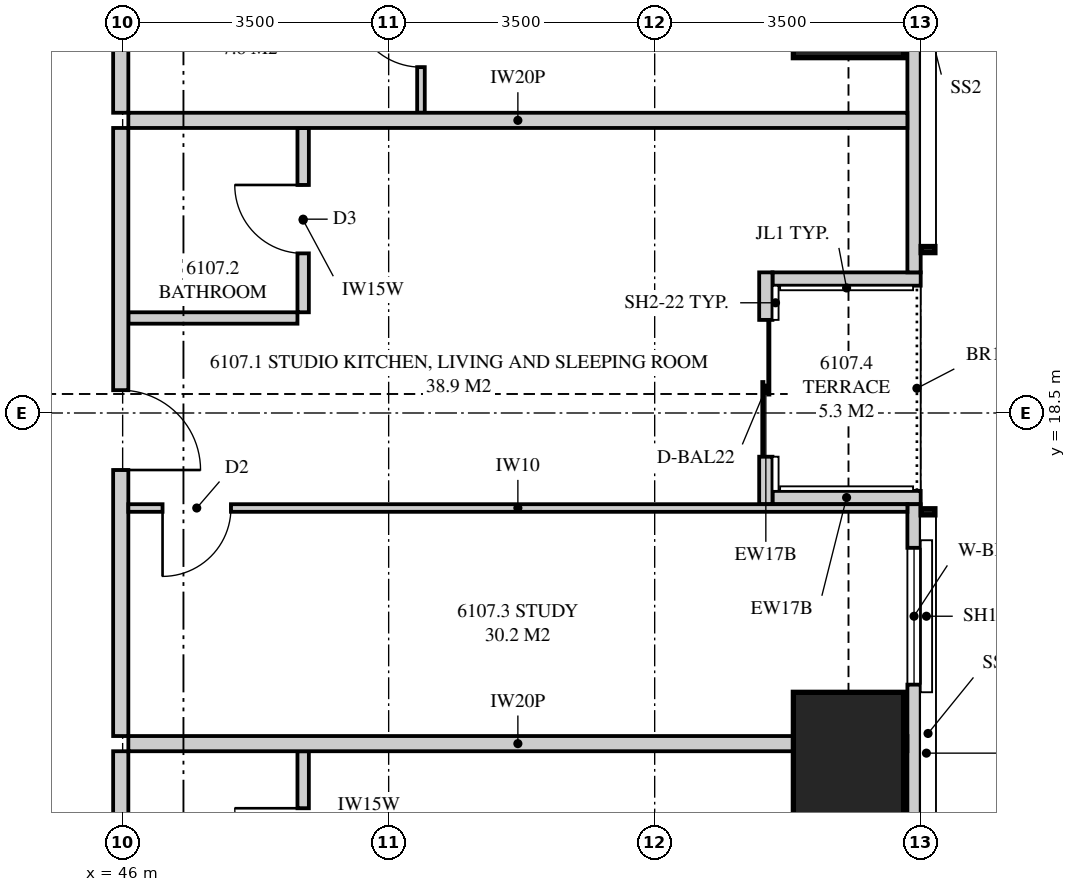
"""IFC4 building model, lengths in metres.
Left out: names, types, materials, properties, quantities, classifications, styles, units other than length and angle.
Written with IfcOpenShell. Run it as: python <this file> out.ifc"""

import sys

from ifc_helpers import new_model, si_unit, direction, frame, frame_2d, origin, origin_2d, place, context, subcontext, project, spatial, polyline, rectangle, outline, extrude, element, fill, save


model = new_model("IFC4")
c1 = context("Model", 3, precision=1e-05, world=origin(), true_north=direction((0.0, 1.0)))
c2 = subcontext(c1, "Body", "Model", "MODEL_VIEW")
j1 = project(units=[si_unit("LENGTHUNIT", "METRE"), si_unit("PLANEANGLEUNIT", "RADIAN")], contexts=[c1])
p1 = place(None, origin())
s1 = spatial("IfcSite", under=j1, at=p1, CompositionType="ELEMENT")
p2 = place(p1, origin())
s2 = spatial("IfcBuilding", under=s1, at=p2, CompositionType="ELEMENT")
p3 = place(p2, frame((0.0, 0.0, 224.95)))
s3 = spatial("IfcBuildingStorey", under=s2, at=p3, CompositionType="ELEMENT", Elevation=224.95)
for number, where, z_axis, x_axis in (
    (1, (55.55, 13.0, 0.0), (0.0, 0.0, 1.0), (1.0, 0.0, 0.0)),
    (2, (55.55, 25.0, 0.0), (0.0, 0.0, 1.0), (1.0, 0.0, 0.0)),
):
    element("IfcColumn", number, at=place(p3, frame(where, z_axis=z_axis, x_axis=x_axis)), inside=s3, PredefinedType="COLUMN", context=c2, shape_type="SweptSolid", body=[
        extrude(rectangle(XDim=1.45, YDim=3.65, at=origin_2d()), origin(), (0.0, 0.0, 1.0), 3.5),
    ])
p4 = place(p3, frame((56.413, 3.051, 0.0), z_axis=(0.0, 0.0, 1.0), x_axis=(0.0, 1.0, 0.0)))
e3 = element("IfcWall", 3, at=p4, inside=s3, PredefinedType="SOLIDWALL", context=c2, shape_type="SweptSolid", body=[
    extrude(outline(polyline([(0.0, 0.0), (14.249, 0.0), (14.249, 2.3), (9.949, 2.3), (9.949, 3.26), (9.858, 3.26), (9.858, 2.3), (9.688, 2.3), (9.688, 3.26), (0.0, 3.26), (0.0, 0.0)])), frame((0.0, 0.087, 0.0), z_axis=(0.0, -1.0, 0.0), x_axis=(1.0, 0.0, 0.0)), (0.0, 0.0, 1.0), 0.175),
])
p5 = place(p4, frame((1.487, 0.0, 0.4)))
e4 = element("IfcOpeningElement", 4, at=p5, cuts=e3, PredefinedType="OPENING", context=c2, shape_type="SweptSolid", body=[
    extrude(rectangle(XDim=1.8, YDim=1.85, at=frame_2d((0.9, 0.925))), frame((0.0, 0.097, 0.0), z_axis=(0.0, -1.0, 0.0), x_axis=(1.0, 0.0, 0.0)), (0.0, 0.0, 1.0), 0.195),
])
p6 = place(p4, frame((5.616, 0.0, 0.4)))
e5 = element("IfcOpeningElement", 5, at=p6, cuts=e3, PredefinedType="OPENING", context=c2, shape_type="SweptSolid", body=[
    extrude(rectangle(XDim=2.4, YDim=1.85, at=frame_2d((1.2, 0.925))), frame((0.0, 0.097, 0.0), z_axis=(0.0, -1.0, 0.0), x_axis=(1.0, 0.0, 0.0)), (0.0, 0.0, 1.0), 0.195),
])
p7 = place(p4, frame((11.875, 0.0, 0.4)))
e6 = element("IfcOpeningElement", 6, at=p7, cuts=e3, PredefinedType="OPENING", context=c2, shape_type="SweptSolid", body=[
    extrude(rectangle(XDim=1.8, YDim=1.85, at=frame_2d((0.9, 0.925))), frame((0.0, 0.097, 0.0), z_axis=(0.0, -1.0, 0.0), x_axis=(1.0, 0.0, 0.0)), (0.0, 0.0, 1.0), 0.195),
])
p8 = place(p3, frame((56.413, 20.35, 0.0), z_axis=(0.0, 0.0, 1.0), x_axis=(0.0, 1.0, 0.0)))
e7 = element("IfcWall", 7, at=p8, inside=s3, PredefinedType="SOLIDWALL", context=c2, shape_type="SweptSolid", body=[
    extrude(outline(polyline([(0.0, 0.0), (10.599, 0.0), (10.599, 3.26), (4.858, 3.26), (4.858, 2.3), (4.793, 2.3), (4.793, 3.26), (4.65, 3.26), (4.65, 2.3), (0.0, 2.3), (0.0, 0.0)])), frame((0.0, 0.087, 0.0), z_axis=(0.0, -1.0, 0.0), x_axis=(1.0, 0.0, 0.0)), (0.0, 0.0, 1.0), 0.175),
])
p9 = place(p8, frame((6.575, 0.0, 0.4)))
e8 = element("IfcOpeningElement", 8, at=p9, cuts=e7, PredefinedType="OPENING", context=c2, shape_type="SweptSolid", body=[
    extrude(rectangle(XDim=1.8, YDim=1.85, at=frame_2d((0.9, 0.925))), frame((0.0, 0.097, 0.0), z_axis=(0.0, -1.0, 0.0), x_axis=(1.0, 0.0, 0.0)), (0.0, 0.0, 1.0), 0.195),
])
p10 = place(p3, frame((54.462, 17.3, 0.0), z_axis=(0.0, 0.0, 1.0), x_axis=(0.0, 1.0, 0.0)))
e9 = element("IfcWall", 9, at=p10, inside=s3, PredefinedType="SOLIDWALL", context=c2, shape_type="SweptSolid", body=[
    extrude(outline(polyline([(0.0, 0.0), (3.05, 0.0), (3.05, 3.26), (2.65, 3.26), (2.65, 2.66), (0.25, 2.66), (0.25, 3.26), (0.0, 3.26), (0.0, 0.0)])), frame((0.0, 0.087, 0.0), z_axis=(0.0, -1.0, 0.0), x_axis=(1.0, 0.0, 0.0)), (0.0, 0.0, 1.0), 0.175),
])
p11 = place(p10, frame((0.625, 0.0, 0.0)))
e10 = element("IfcOpeningElement", 10, at=p11, cuts=e9, PredefinedType="OPENING", context=c2, shape_type="SweptSolid", body=[
    extrude(rectangle(XDim=1.8, YDim=2.25, at=frame_2d((0.9, 1.125))), frame((0.0, 0.097, 0.0), z_axis=(0.0, -1.0, 0.0), x_axis=(1.0, 0.0, 0.0)), (0.0, 0.0, 1.0), 0.195),
])
for number, where, z_axis, x_axis in (
    (11, (56.5, 17.387, 0.0), (0.0, 0.0, 1.0), (-1.0, 0.0, 0.0)),
    (12, (56.5, 20.262, 0.0), (0.0, 0.0, 1.0), (-1.0, 0.0, 0.0)),
):
    element("IfcWall", number, at=place(p3, frame(where, z_axis=z_axis, x_axis=x_axis)), inside=s3, PredefinedType="SOLIDWALL", context=c2, shape_type="SweptSolid", body=[
        extrude(outline(polyline([(0.0, 0.0), (1.95, 0.0), (1.95, 3.26), (1.75, 3.26), (1.75, 2.3), (0.15, 2.3), (0.15, 3.26), (0.0, 3.26), (0.0, 0.0)])), frame((0.0, 0.087, 0.0), z_axis=(0.0, -1.0, 0.0), x_axis=(1.0, 0.0, 0.0)), (0.0, 0.0, 1.0), 0.175),
    ])
p12 = place(p3, frame((56.325, 14.15, 0.0), z_axis=(0.0, 0.0, 1.0), x_axis=(-1.0, 0.0, 0.0)))
e13 = element("IfcWall", 13, at=p12, inside=s3, PredefinedType="PARTITIONING", context=c2, shape_type="SweptSolid", body=[
    extrude(outline(polyline([(0.529, 2.3), (0.0, 2.3), (0.0, 0.0), (0.529, 0.0), (0.529, 0.396), (1.021, 0.396), (1.021, 0.0), (10.25, 0.0), (10.25, 2.66), (1.685, 2.66), (1.685, 2.3), (1.021, 2.3), (1.021, 1.904), (0.529, 1.904), (0.529, 2.3)])), frame((0.0, 0.1, 0.0), z_axis=(0.0, -1.0, 0.0), x_axis=(1.0, 0.0, 0.0)), (0.0, 0.0, 1.0), 0.2),
])
p13 = place(p3, frame((45.975, 8.025, 0.0), z_axis=(0.0, 0.0, 1.0), x_axis=(0.0, 1.0, 0.0)))
e14 = element("IfcWall", 14, at=p13, inside=s3, PredefinedType="PARTITIONING", context=c2, shape_type="SweptSolid", body=[
    extrude(outline(polyline([(0.0, 0.0), (6.025, 0.0), (6.025, 3.26), (6.025, 2.66), (5.085, 2.66), (0.0, 2.66), (0.0, 3.26), (0.0, 0.0)])), frame((0.0, 0.1, 0.0), z_axis=(0.0, -1.0, 0.0), x_axis=(1.0, 0.0, 0.0)), (0.0, 0.0, 1.0), 0.2),
])
p14 = place(p13, frame((2.512, 0.0, 0.0)))
e15 = element("IfcOpeningElement", 15, at=p14, cuts=e14, PredefinedType="OPENING", context=c2, shape_type="SweptSolid", body=[
    extrude(rectangle(XDim=1.05, YDim=2.2, at=frame_2d((0.525, 1.1))), frame((0.0, 0.11, 0.0), z_axis=(0.0, -1.0, 0.0), x_axis=(1.0, 0.0, 0.0)), (0.0, 0.0, 1.0), 0.22),
])
p15 = place(p3, frame((48.375, 11.625, 0.0), z_axis=(0.0, 0.0, 1.0), x_axis=(0.0, 1.0, 0.0)))
e16 = element("IfcWall", 16, at=p15, inside=s3, PredefinedType="PLUMBINGWALL", context=c2, shape_type="SweptSolid", body=[
    extrude(outline(polyline([(0.0, 0.0), (2.425, 0.0), (2.425, 3.26), (2.425, 2.66), (0.09, 2.66), (0.09, 3.26), (0.0, 3.26), (0.0, 0.0)])), frame((0.0, 0.075, 0.0), z_axis=(0.0, -1.0, 0.0), x_axis=(1.0, 0.0, 0.0)), (0.0, 0.0, 1.0), 0.15),
])
p16 = place(p15, frame((0.775, 0.0, 0.0)))
e17 = element("IfcOpeningElement", 17, at=p16, cuts=e16, PredefinedType="OPENING", context=c2, shape_type="SweptSolid", body=[
    extrude(rectangle(XDim=0.9, YDim=2.1, at=frame_2d((0.45, 1.05))), frame((0.0, 0.085, 0.0), z_axis=(0.0, -1.0, 0.0), x_axis=(1.0, 0.0, 0.0)), (0.0, 0.0, 1.0), 0.17),
])
p17 = place(p3, frame((56.325, 22.35, 0.0), z_axis=(0.0, 0.0, 1.0), x_axis=(-1.0, 0.0, 0.0)))
e18 = element("IfcWall", 18, at=p17, inside=s3, PredefinedType="PARTITIONING", context=c2, shape_type="SweptSolid", body=[
    extrude(outline(polyline([(0.0, 0.0), (10.25, 0.0), (10.25, 3.26), (1.685, 3.26), (1.685, 2.3), (0.0, 2.3), (0.0, 3.26), (0.0, 0.0)])), frame((0.0, 0.1, 0.0), z_axis=(0.0, -1.0, 0.0), x_axis=(1.0, 0.0, 0.0)), (0.0, 0.0, 1.0), 0.2),
])
p18 = place(p3, frame((45.975, 14.25, 0.0), z_axis=(0.0, 0.0, 1.0), x_axis=(0.0, 1.0, 0.0)))
e19 = element("IfcWall", 19, at=p18, inside=s3, PredefinedType="PARTITIONING", context=c2, shape_type="SweptSolid", body=[
    extrude(outline(polyline([(0.0, 0.0), (8.0, 0.0), (8.0, 3.26), (5.81, 3.26), (5.81, 2.66), (3.19, 2.66), (3.19, 3.26), (0.06, 3.26), (0.06, 2.66), (0.0, 2.66), (0.0, 3.26), (0.0, 0.0)])), frame((0.0, 0.1, 0.0), z_axis=(0.0, -1.0, 0.0), x_axis=(1.0, 0.0, 0.0)), (0.0, 0.0, 1.0), 0.2),
])
p19 = place(p18, frame((3.5, 0.0, 0.0)))
e20 = element("IfcOpeningElement", 20, at=p19, cuts=e19, PredefinedType="OPENING", context=c2, shape_type="SweptSolid", body=[
    extrude(rectangle(XDim=1.05, YDim=2.2, at=frame_2d((0.525, 1.1))), frame((0.0, 0.11, 0.0), z_axis=(0.0, -1.0, 0.0), x_axis=(1.0, 0.0, 0.0)), (0.0, 0.0, 1.0), 0.22),
])
p20 = place(p3, frame((48.375, 19.825, 0.0), z_axis=(0.0, 0.0, 1.0), x_axis=(0.0, 1.0, 0.0)))
e21 = element("IfcWall", 21, at=p20, inside=s3, PredefinedType="PLUMBINGWALL", context=c2, shape_type="SweptSolid", body=[
    extrude(outline(polyline([(0.0, 0.0), (2.425, 0.0), (2.425, 3.26), (0.21, 3.26), (0.21, 2.66), (0.0, 2.66), (0.0, 3.26), (0.0, 0.0)])), frame((0.0, 0.075, 0.0), z_axis=(0.0, -1.0, 0.0), x_axis=(1.0, 0.0, 0.0)), (0.0, 0.0, 1.0), 0.15),
])
p21 = place(p20, frame((0.775, 0.0, 0.0)))
e22 = element("IfcOpeningElement", 22, at=p21, cuts=e21, PredefinedType="OPENING", context=c2, shape_type="SweptSolid", body=[
    extrude(rectangle(XDim=0.9, YDim=2.1, at=frame_2d((0.45, 1.05))), frame((0.0, 0.085, 0.0), z_axis=(0.0, -1.0, 0.0), x_axis=(1.0, 0.0, 0.0)), (0.0, 0.0, 1.0), 0.17),
])
p22 = place(p3, frame((48.3, 19.75, 0.0), z_axis=(0.0, 0.0, 1.0), x_axis=(-1.0, 0.0, 0.0)))
e23 = element("IfcWall", 23, at=p22, inside=s3, PredefinedType="PLUMBINGWALL", context=c2, shape_type="SweptSolid", body=[
    extrude(outline(polyline([(0.0, 0.0), (2.225, 0.0), (2.225, 3.26), (2.225, 2.66), (0.0, 2.66), (0.0, 3.26), (0.0, 0.0)])), frame((0.0, 0.075, 0.0), z_axis=(0.0, -1.0, 0.0), x_axis=(1.0, 0.0, 0.0)), (0.0, 0.0, 1.0), 0.15),
])
p23 = place(p3, frame((56.325, 17.25, 0.0), z_axis=(0.0, 0.0, 1.0), x_axis=(-1.0, 0.0, 0.0)))
e24 = element("IfcWall", 24, at=p23, inside=s3, PredefinedType="PARTITIONING", context=c2, shape_type="SweptSolid", body=[
    extrude(outline(polyline([(0.0, 0.0), (10.25, 0.0), (10.25, 3.26), (1.635, 3.26), (1.635, 2.3), (0.0, 2.3), (0.0, 3.26), (0.0, 0.0)])), frame((0.0, 0.05, 0.0), z_axis=(0.0, -1.0, 0.0), x_axis=(1.0, 0.0, 0.0)), (0.0, 0.0, 1.0), 0.1),
])
p24 = place(p23, frame((8.9, 0.0, 0.0)))
e25 = element("IfcOpeningElement", 25, at=p24, cuts=e24, PredefinedType="OPENING", context=c2, shape_type="SweptSolid", body=[
    extrude(rectangle(XDim=0.9, YDim=2.1, at=frame_2d((0.45, 1.05))), frame((0.0, 0.06, 0.0), z_axis=(0.0, -1.0, 0.0), x_axis=(1.0, 0.0, 0.0)), (0.0, 0.0, 1.0), 0.12),
])
p25 = place(p3, frame((45.975, 22.45, 0.0), z_axis=(0.0, 0.0, 1.0), x_axis=(0.0, 1.0, 0.0)))
e26 = element("IfcWall", 26, at=p25, inside=s3, PredefinedType="PARTITIONING", context=c2, shape_type="SweptSolid", body=[
    extrude(outline(polyline([(0.0, 0.0), (2.55, 0.0), (2.55, 2.66), (1.24, 2.66), (1.24, 3.26), (0.0, 3.26), (0.0, 0.0)])), frame((0.0, 0.1, 0.0), z_axis=(0.0, -1.0, 0.0), x_axis=(1.0, 0.0, 0.0)), (0.0, 0.0, 1.0), 0.2),
])
p26 = place(p3, frame((49.925, 22.45, 0.0), z_axis=(0.0, 0.0, 1.0), x_axis=(0.0, 1.0, 0.0)))
e27 = element("IfcWall", 27, at=p26, inside=s3, PredefinedType="PARTITIONING", context=c2, shape_type="SweptSolid", body=[
    extrude(outline(polyline([(0.0, 0.0), (2.1, 0.0), (2.1, 3.26), (2.1, 2.66), (1.29, 2.66), (1.29, 3.26), (0.0, 3.26), (0.0, 0.0)])), frame((0.0, 0.05, 0.0), z_axis=(0.0, -1.0, 0.0), x_axis=(1.0, 0.0, 0.0)), (0.0, 0.0, 1.0), 0.1),
])
p27 = place(p26, frame((0.6, 0.0, 0.0)))
e28 = element("IfcOpeningElement", 28, at=p27, cuts=e27, PredefinedType="OPENING", context=c2, shape_type="SweptSolid", body=[
    extrude(rectangle(XDim=0.9, YDim=2.1, at=frame_2d((0.45, 1.05))), frame((0.0, 0.06, 0.0), z_axis=(0.0, -1.0, 0.0), x_axis=(1.0, 0.0, 0.0)), (0.0, 0.0, 1.0), 0.12),
])
p28 = place(p7, origin())
e29 = element("IfcWindow", 29, at=p28, inside=s3, PartitioningType="SINGLE_PANEL", PredefinedType="WINDOW", context=c2, shape_type="SweptSolid", body=[
    extrude(rectangle(XDim=1.8, YDim=1.85, at=frame_2d((0.9, 0.925))), frame((0.0, 0.03, 0.0), z_axis=(0.0, -1.0, 0.0), x_axis=(1.0, 0.0, 0.0)), (0.0, 0.0, 1.0), 0.06),
])
fill(e6, e29)
p29 = place(p11, origin())
e30 = element("IfcDoor", 30, at=p29, inside=s3, OperationType="SLIDING_TO_LEFT", PredefinedType="DOOR", context=c2, shape_type="SweptSolid", body=[
    extrude(rectangle(XDim=1.8, YDim=2.25, at=frame_2d((0.9, 1.125))), frame((0.0, 0.025, 0.0), z_axis=(0.0, -1.0, 0.0), x_axis=(1.0, 0.0, 0.0)), (0.0, 0.0, 1.0), 0.05),
])
fill(e10, e30)
p30 = place(p16, origin())
e31 = element("IfcDoor", 31, at=p30, inside=s3, OperationType="SINGLE_SWING_RIGHT", PredefinedType="DOOR", context=c2, shape_type="SweptSolid", body=[
    extrude(rectangle(XDim=0.9, YDim=2.1, at=frame_2d((0.45, 1.05))), frame((0.0, 0.025, 0.0), z_axis=(0.0, -1.0, 0.0), x_axis=(1.0, 0.0, 0.0)), (0.0, 0.0, 1.0), 0.05),
])
fill(e17, e31)
p31 = place(p19, frame((1.05, 0.0, 0.0), z_axis=(0.0, 0.0, 1.0), x_axis=(-1.0, 0.0, 0.0)))
e32 = element("IfcDoor", 32, at=p31, inside=s3, OperationType="SINGLE_SWING_RIGHT", PredefinedType="DOOR", context=c2, shape_type="SweptSolid", body=[
    extrude(rectangle(XDim=1.05, YDim=2.2, at=frame_2d((0.525, 1.1))), frame((0.0, 0.025, 0.0), z_axis=(0.0, -1.0, 0.0), x_axis=(1.0, 0.0, 0.0)), (0.0, 0.0, 1.0), 0.05),
])
fill(e20, e32)
p32 = place(p21, origin())
e33 = element("IfcDoor", 33, at=p32, inside=s3, OperationType="SINGLE_SWING_RIGHT", PredefinedType="DOOR", context=c2, shape_type="SweptSolid", body=[
    extrude(rectangle(XDim=0.9, YDim=2.1, at=frame_2d((0.45, 1.05))), frame((0.0, 0.025, 0.0), z_axis=(0.0, -1.0, 0.0), x_axis=(1.0, 0.0, 0.0)), (0.0, 0.0, 1.0), 0.05),
])
fill(e22, e33)
p33 = place(p24, origin())
e34 = element("IfcDoor", 34, at=p33, inside=s3, OperationType="SINGLE_SWING_RIGHT", PredefinedType="DOOR", context=c2, shape_type="SweptSolid", body=[
    extrude(rectangle(XDim=0.9, YDim=2.1, at=frame_2d((0.45, 1.05))), frame((0.0, 0.025, 0.0), z_axis=(0.0, -1.0, 0.0), x_axis=(1.0, 0.0, 0.0)), (0.0, 0.0, 1.0), 0.05),
])
fill(e25, e34)
p34 = place(p27, origin())
e35 = element("IfcDoor", 35, at=p34, inside=s3, OperationType="SINGLE_SWING_RIGHT", PredefinedType="DOOR", context=c2, shape_type="SweptSolid", body=[
    extrude(rectangle(XDim=0.9, YDim=2.1, at=frame_2d((0.45, 1.05))), frame((0.0, 0.025, 0.0), z_axis=(0.0, -1.0, 0.0), x_axis=(1.0, 0.0, 0.0)), (0.0, 0.0, 1.0), 0.05),
])
fill(e28, e35)
save(model, sys.argv[1])
